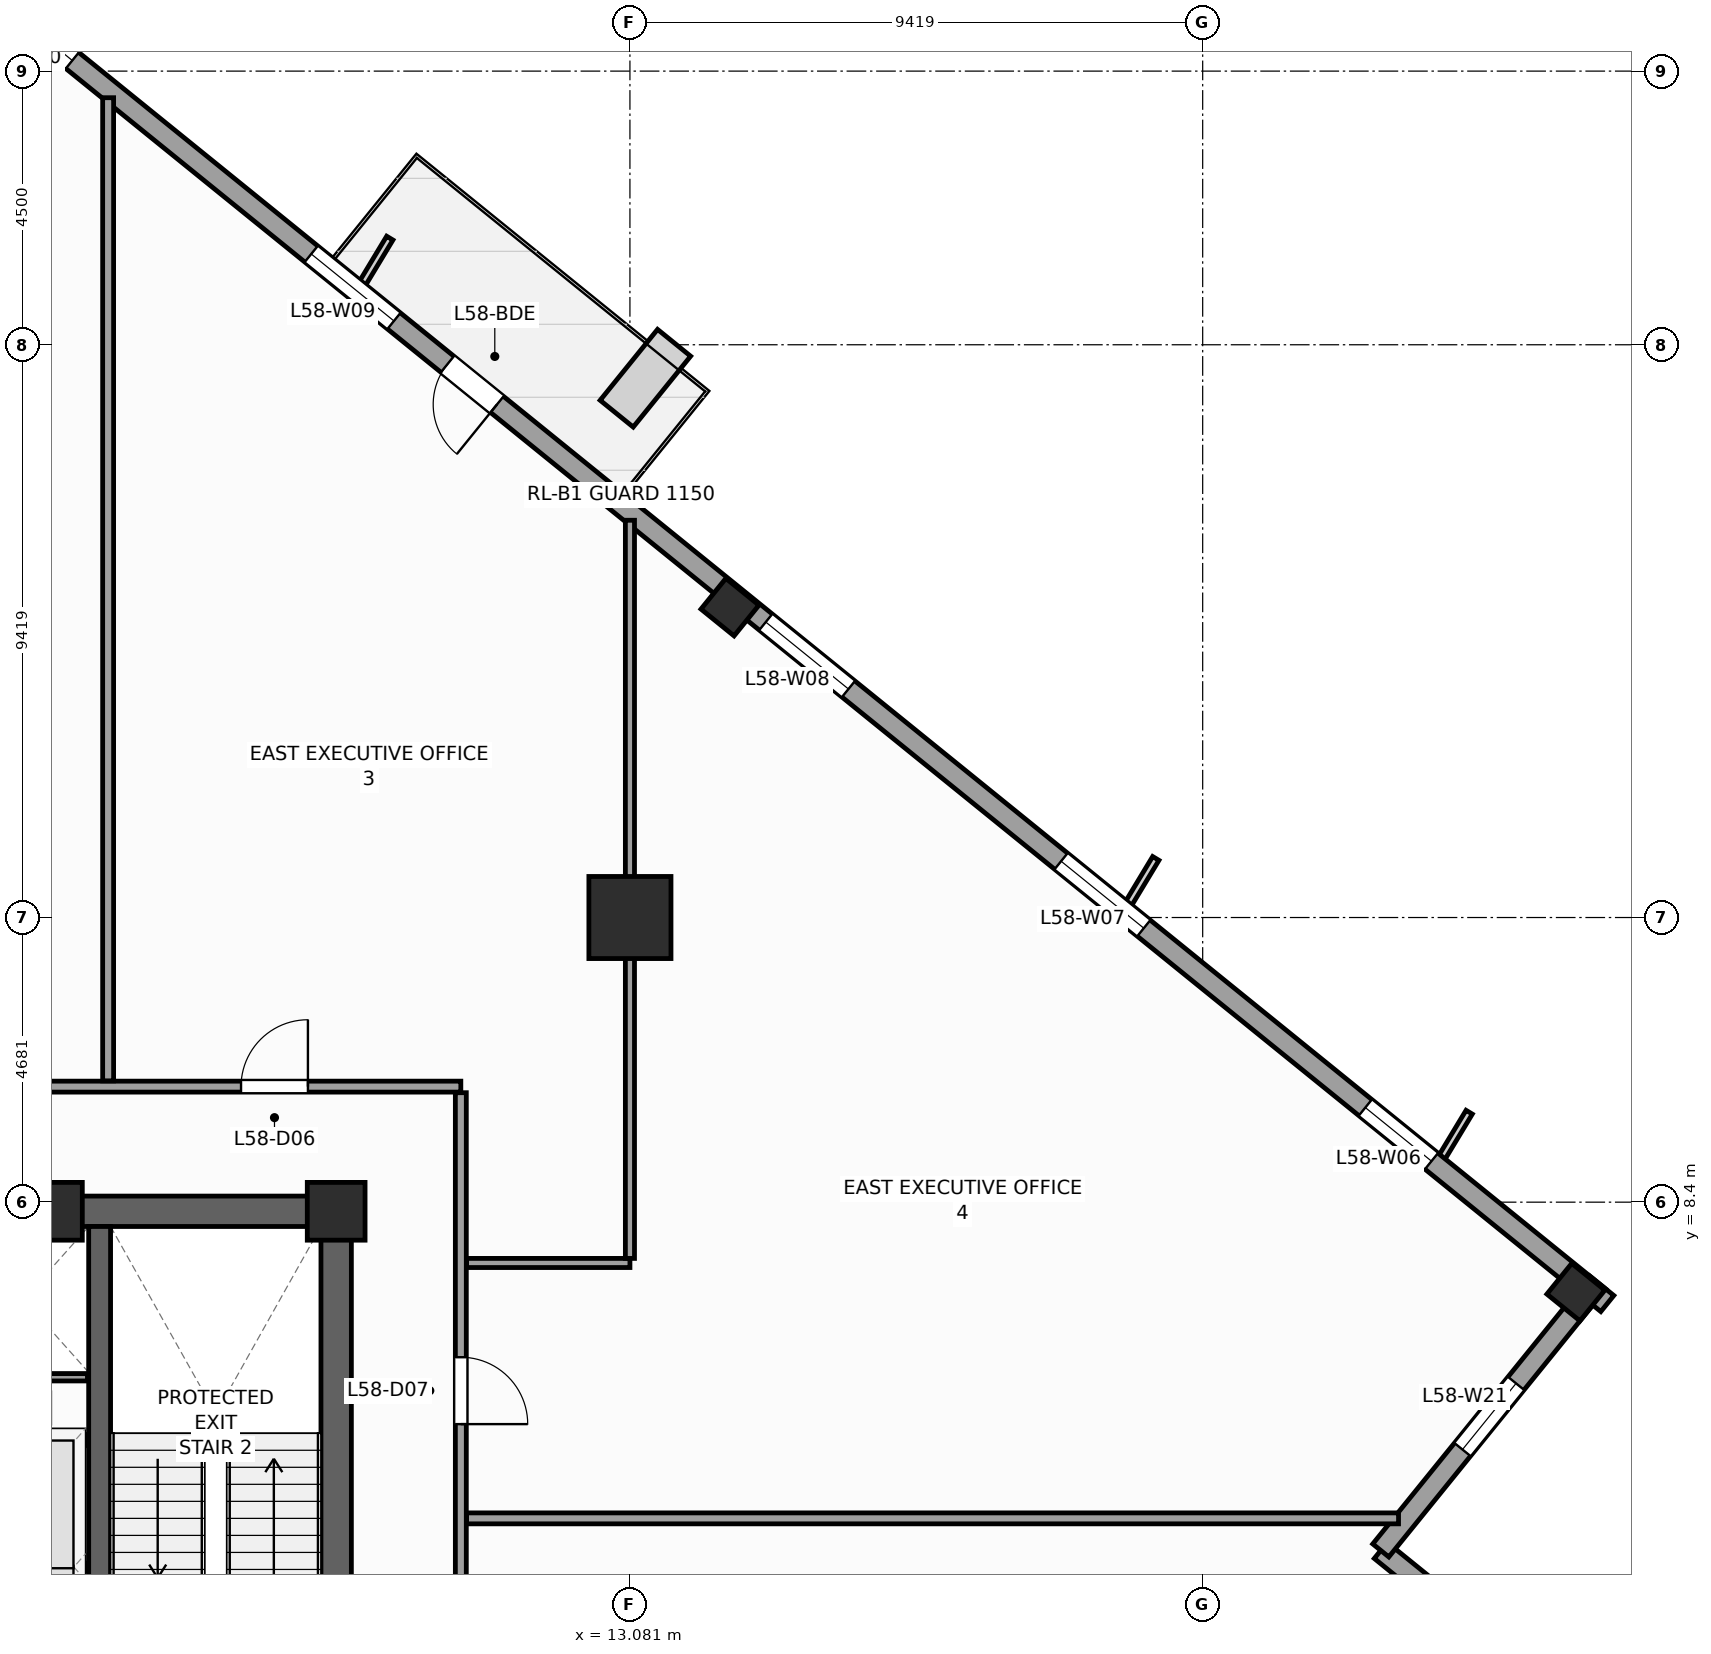
"""IFC4 building model, lengths in metres.
Left out: names, types, materials, properties, quantities, classifications, styles, units other than length and angle.
Written with IfcOpenShell. Run it as: python <this file> out.ifc"""

import sys

from ifc_helpers import new_model, si_unit, direction, frame, frame_2d, origin, origin_2d, place, context, subcontext, project, spatial, rectangle, extrude, source, transform, mapped, element, fill, save


model = new_model("IFC4")
c1 = context("Model", 3, precision=1e-05, world=origin(), true_north=direction((0.0, 1.0)))
c2 = subcontext(c1, "Body", "Model", "MODEL_VIEW")
j1 = project(units=[si_unit("LENGTHUNIT", "METRE"), si_unit("PLANEANGLEUNIT", "RADIAN")], contexts=[c1])
p1 = place(None, origin())
s1 = spatial("IfcSite", under=j1, at=p1, CompositionType="ELEMENT")
p2 = place(p1, origin())
s2 = spatial("IfcBuilding", under=s1, at=p2, CompositionType="ELEMENT")
p3 = place(p2, frame((0.0, 0.0, 240.7)))
s3 = spatial("IfcBuildingStorey", under=s2, at=p3, CompositionType="ELEMENT", Elevation=240.7)
p4 = place(p3, frame((-8.5, 8.25, 0.0), z_axis=(0.0, 0.0, 1.0), x_axis=(1.0, 0.0, 0.0)))
e1 = element("IfcWall", 1, at=p4, inside=s3, PredefinedType="SHEAR", context=c2, shape_type="SweptSolid", body=[
    extrude(rectangle(XDim=17.0, YDim=0.5, at=frame_2d((8.5, 0.0))), origin(), (0.0, 0.0, 1.0), 3.9),
])
p5 = place(p3, frame((8.25, -8.0, 0.0), z_axis=(0.0, 0.0, 1.0), x_axis=(0.0, 1.0, 0.0)))
e2 = element("IfcWall", 2, at=p5, inside=s3, PredefinedType="SHEAR", context=c2, shape_type="SweptSolid", body=[
    extrude(rectangle(XDim=16.0, YDim=0.5, at=frame_2d((8.0, 0.0))), origin(), (0.0, 0.0, 1.0), 3.9),
])
p6 = place(p5, frame((4.69, 0.0, 0.0)))
e3 = element("IfcOpeningElement", 3, at=p6, cuts=e2, PredefinedType="OPENING", context=c2, shape_type="SweptSolid", body=[
    extrude(rectangle(XDim=1.3, YDim=2.2, at=frame_2d((0.65, 1.1))), frame((0.0, 0.26, 0.0), z_axis=(0.0, -1.0, 0.0), x_axis=(1.0, 0.0, 0.0)), (0.0, 0.0, 1.0), 0.52),
])
p7 = place(p3, frame((4.36, -8.0, 0.0), z_axis=(0.0, 0.0, 1.0), x_axis=(0.0, 1.0, 0.0)))
e4 = element("IfcWall", 4, at=p7, inside=s3, PredefinedType="SHEAR", context=c2, shape_type="SweptSolid", body=[
    extrude(rectangle(XDim=16.0, YDim=0.36, at=frame_2d((8.0, 0.0))), origin(), (0.0, 0.0, 1.0), 3.9),
])
m1 = source(origin(), c2, "Body", "SweptSolid", [
    extrude(rectangle(XDim=0.95, YDim=0.95, at=origin_2d()), origin(), (0.0, 0.0, 1.0), 3.9),
])
for number, where, z_axis, x_axis in (
    (5, (8.25, 8.25, 0.0), (0.0, 0.0, 1.0), (1.0, 0.0, 0.0)),
    (6, (3.6, 8.25, 0.0), (0.0, 0.0, 1.0), (1.0, 0.0, 0.0)),
):
    element("IfcColumn", number, at=place(p3, frame(where, z_axis=z_axis, x_axis=x_axis)), inside=s3, PredefinedType="PILASTER", context=c2, shape_type="MappedRepresentation", body=[
        mapped(m1, transform((0.0, 0.0, 0.0), scale=1.0)),
    ])
m2 = source(origin(), c2, "Body", "SweptSolid", [
    extrude(rectangle(XDim=1.35, YDim=1.35, at=origin_2d()), origin(), (0.0, 0.0, 1.0), 3.9),
])
p8 = place(p3, frame((13.081, 13.081, 0.0), z_axis=(0.0, 0.0, 1.0), x_axis=(1.0, 0.0, 0.0)))
e7 = element("IfcColumn", 7, at=p8, inside=s3, PredefinedType="COLUMN", context=c2, shape_type="MappedRepresentation", body=[
    mapped(m2, transform((0.0, 0.0, 0.0), scale=1.0)),
])
m3 = source(origin(), c2, "Body", "SweptSolid", [
    extrude(rectangle(XDim=0.65, YDim=0.7, at=origin_2d()), origin(), (0.0, 0.0, 1.0), 3.9),
])
for number, where, z_axis, x_axis in (
    (8, (28.637, 6.92, 0.0), (0.0, 0.0, 1.0), (0.629, 0.777, 0.0)),
    (9, (14.726, 18.185, 0.0), (0.0, 0.0, 1.0), (0.629, 0.777, 0.0)),
):
    element("IfcColumn", number, at=place(p3, frame(where, z_axis=z_axis, x_axis=x_axis)), inside=s3, PredefinedType="COLUMN", context=c2, shape_type="MappedRepresentation", body=[
        mapped(m3, transform((0.0, 0.0, 0.0), scale=1.0)),
    ])
p9 = place(p3, frame((29.703, -0.789, 0.0), z_axis=(0.0, 0.0, 1.0), x_axis=(-0.77714355312, 0.629323365087, 0.0)))
e10 = element("IfcWall", 10, at=p9, inside=s3, PredefinedType="STANDARD", context=c2, shape_type="SweptSolid", body=[
    extrude(rectangle(XDim=5.5, YDim=0.34, at=frame_2d((2.75, 0.0))), origin(), (0.0, 0.0, 1.0), 3.66),
])
p10 = place(p3, frame((25.429, 2.673, 0.0), z_axis=(0.0, 0.0, 1.0), x_axis=(0.629299794138, 0.777162640055, 0.0)))
e11 = element("IfcWall", 11, at=p10, inside=s3, PredefinedType="STANDARD", context=c2, shape_type="SweptSolid", body=[
    extrude(rectangle(XDim=5.67, YDim=0.34, at=frame_2d((2.835, 0.0))), origin(), (0.0, 0.0, 1.0), 3.66),
])
p11 = place(p10, frame((2.135, 0.0, 0.48)))
e12 = element("IfcOpeningElement", 12, at=p11, cuts=e11, PredefinedType="OPENING", context=c2, shape_type="SweptSolid", body=[
    extrude(rectangle(XDim=1.4, YDim=2.4, at=frame_2d((0.7, 1.2))), frame((0.0, 0.18, 0.0), z_axis=(0.0, -1.0, 0.0), x_axis=(1.0, 0.0, 0.0)), (0.0, 0.0, 1.0), 0.36),
])
p12 = place(p3, frame((29.154, 6.733, 0.0), z_axis=(0.0, 0.0, 1.0), x_axis=(-0.77714192302, 0.629325378072, 0.0)))
e13 = element("IfcWall", 13, at=p12, inside=s3, PredefinedType="STANDARD", context=c2, shape_type="SweptSolid", body=[
    extrude(rectangle(XDim=36.84, YDim=0.34, at=frame_2d((18.42, 0.0))), origin(), (0.0, 0.0, 1.0), 2.96),
])
p13 = place(p12, frame((23.495, 0.0, 0.0)))
e14 = element("IfcOpeningElement", 14, at=p13, cuts=e13, PredefinedType="OPENING", context=c2, shape_type="SweptSolid", body=[
    extrude(rectangle(XDim=1.05, YDim=2.25, at=frame_2d((0.525, 1.125))), frame((0.0, 0.18, 0.0), z_axis=(0.0, -1.0, 0.0), x_axis=(1.0, 0.0, 0.0)), (0.0, 0.0, 1.0), 0.36),
])
p14 = place(p12, frame((3.721, 0.0, 0.48)))
e15 = element("IfcOpeningElement", 15, at=p14, cuts=e13, PredefinedType="OPENING", context=c2, shape_type="SweptSolid", body=[
    extrude(rectangle(XDim=1.4, YDim=2.4, at=frame_2d((0.7, 1.2))), frame((0.0, 0.18, 0.0), z_axis=(0.0, -1.0, 0.0), x_axis=(1.0, 0.0, 0.0)), (0.0, 0.0, 1.0), 0.36),
])
p15 = place(p12, frame((9.809, 0.0, 0.58)))
e16 = element("IfcOpeningElement", 16, at=p15, cuts=e13, PredefinedType="OPENING", context=c2, shape_type="SweptSolid", body=[
    extrude(rectangle(XDim=1.75, YDim=2.3, at=frame_2d((0.875, 1.15))), frame((0.0, 0.18, 0.0), z_axis=(0.0, -1.0, 0.0), x_axis=(1.0, 0.0, 0.0)), (0.0, 0.0, 1.0), 0.36),
])
p16 = place(p12, frame((16.058, 0.0, 0.58)))
e17 = element("IfcOpeningElement", 17, at=p16, cuts=e13, PredefinedType="OPENING", context=c2, shape_type="SweptSolid", body=[
    extrude(rectangle(XDim=1.75, YDim=2.3, at=frame_2d((0.875, 1.15))), frame((0.0, 0.18, 0.0), z_axis=(0.0, -1.0, 0.0), x_axis=(1.0, 0.0, 0.0)), (0.0, 0.0, 1.0), 0.36),
])
p17 = place(p12, frame((25.676, 0.0, 0.58)))
e18 = element("IfcOpeningElement", 18, at=p17, cuts=e13, PredefinedType="OPENING", context=c2, shape_type="SweptSolid", body=[
    extrude(rectangle(XDim=1.75, YDim=2.3, at=frame_2d((0.875, 1.15))), frame((0.0, 0.18, 0.0), z_axis=(0.0, -1.0, 0.0), x_axis=(1.0, 0.0, 0.0)), (0.0, 0.0, 1.0), 0.36),
])
p18 = place(p12, frame((32.482, 0.0, 0.48)))
e19 = element("IfcOpeningElement", 19, at=p18, cuts=e13, PredefinedType="OPENING", context=c2, shape_type="SweptSolid", body=[
    extrude(rectangle(XDim=1.4, YDim=2.4, at=frame_2d((0.7, 1.2))), frame((0.0, 0.18, 0.0), z_axis=(0.0, -1.0, 0.0), x_axis=(1.0, 0.0, 0.0)), (0.0, 0.0, 1.0), 0.36),
])
p19 = place(p3, frame((1.89, 4.49, 0.0), z_axis=(0.0, 0.0, 1.0), x_axis=(1.0, 0.0, 0.0)))
e20 = element("IfcWall", 20, at=p19, inside=s3, PredefinedType="PARTITIONING", context=c2, shape_type="SweptSolid", body=[
    extrude(rectangle(XDim=2.28, YDim=0.18, at=frame_2d((1.14, 0.0))), origin(), (0.0, 0.0, 1.0), 3.66),
])
p20 = place(p3, frame((1.9, 2.4, 0.0), z_axis=(0.0, 0.0, 1.0), x_axis=(1.0, 0.0, 0.0)))
e21 = element("IfcWall", 21, at=p20, inside=s3, PredefinedType="PARTITIONING", context=c2, shape_type="SweptSolid", body=[
    extrude(rectangle(XDim=2.26, YDim=0.12, at=frame_2d((1.13, 0.0))), origin(), (0.0, 0.0, 1.0), 3.66),
])
p21 = place(p3, frame((2.06, 5.52, 0.0), z_axis=(0.0, 0.0, 1.0), x_axis=(1.0, 0.0, 0.0)))
e22 = element("IfcWall", 22, at=p21, inside=s3, PredefinedType="PARTITIONING", context=c2, shape_type="SweptSolid", body=[
    extrude(rectangle(XDim=2.1, YDim=0.12, at=frame_2d((1.05, 0.0))), origin(), (0.0, 0.0, 1.0), 3.66),
])
p22 = place(p3, frame((-11.4, 10.3, 0.0), z_axis=(0.0, 0.0, 1.0), x_axis=(1.0, 0.0, 0.0)))
e23 = element("IfcWall", 23, at=p22, inside=s3, PredefinedType="PARTITIONING", context=c2, shape_type="SweptSolid", body=[
    extrude(rectangle(XDim=21.7, YDim=0.18, at=frame_2d((10.85, 0.0))), origin(), (0.0, 0.0, 1.0), 3.66),
])
p23 = place(p22, frame((10.925, 0.0, 0.0)))
e24 = element("IfcOpeningElement", 24, at=p23, cuts=e23, PredefinedType="OPENING", context=c2, shape_type="SweptSolid", body=[
    extrude(rectangle(XDim=0.95, YDim=2.1, at=frame_2d((0.475, 1.05))), frame((0.0, 0.1, 0.0), z_axis=(0.0, -1.0, 0.0), x_axis=(1.0, 0.0, 0.0)), (0.0, 0.0, 1.0), 0.2),
])
p24 = place(p22, frame((3.724, 0.0, 0.0)))
e25 = element("IfcOpeningElement", 25, at=p24, cuts=e23, PredefinedType="OPENING", context=c2, shape_type="SweptSolid", body=[
    extrude(rectangle(XDim=1.1, YDim=2.2, at=frame_2d((0.55, 1.1))), frame((0.0, 0.1, 0.0), z_axis=(0.0, -1.0, 0.0), x_axis=(1.0, 0.0, 0.0)), (0.0, 0.0, 1.0), 0.2),
])
p25 = place(p22, frame((8.326, 0.0, 0.0)))
e26 = element("IfcOpeningElement", 26, at=p25, cuts=e23, PredefinedType="OPENING", context=c2, shape_type="SweptSolid", body=[
    extrude(rectangle(XDim=1.1, YDim=2.2, at=frame_2d((0.55, 1.1))), frame((0.0, 0.1, 0.0), z_axis=(0.0, -1.0, 0.0), x_axis=(1.0, 0.0, 0.0)), (0.0, 0.0, 1.0), 0.2),
])
p26 = place(p22, frame((18.085, 0.0, 0.0)))
e27 = element("IfcOpeningElement", 27, at=p26, cuts=e23, PredefinedType="OPENING", context=c2, shape_type="SweptSolid", body=[
    extrude(rectangle(XDim=1.1, YDim=2.2, at=frame_2d((0.55, 1.1))), frame((0.0, 0.1, 0.0), z_axis=(0.0, -1.0, 0.0), x_axis=(1.0, 0.0, 0.0)), (0.0, 0.0, 1.0), 0.2),
])
p27 = place(p3, frame((10.3, -10.2, 0.0), z_axis=(0.0, 0.0, 1.0), x_axis=(0.0, 1.0, 0.0)))
e28 = element("IfcWall", 28, at=p27, inside=s3, PredefinedType="PARTITIONING", context=c2, shape_type="SweptSolid", body=[
    extrude(rectangle(XDim=20.4, YDim=0.18, at=frame_2d((10.2, 0.0))), origin(), (0.0, 0.0, 1.0), 3.66),
])
p28 = place(p27, frame((14.95, 0.0, 0.0)))
e29 = element("IfcOpeningElement", 29, at=p28, cuts=e28, PredefinedType="OPENING", context=c2, shape_type="SweptSolid", body=[
    extrude(rectangle(XDim=1.1, YDim=2.2, at=frame_2d((0.55, 1.1))), frame((0.0, 0.1, 0.0), z_axis=(0.0, -1.0, 0.0), x_axis=(1.0, 0.0, 0.0)), (0.0, 0.0, 1.0), 0.2),
])
p29 = place(p27, frame((9.65, 0.0, 0.0)))
e30 = element("IfcOpeningElement", 30, at=p29, cuts=e28, PredefinedType="OPENING", context=c2, shape_type="SweptSolid", body=[
    extrude(rectangle(XDim=1.1, YDim=2.2, at=frame_2d((0.55, 1.1))), frame((0.0, 0.1, 0.0), z_axis=(0.0, -1.0, 0.0), x_axis=(1.0, 0.0, 0.0)), (0.0, 0.0, 1.0), 0.2),
])
p30 = place(p27, frame((4.35, 0.0, 0.0)))
e31 = element("IfcOpeningElement", 31, at=p30, cuts=e28, PredefinedType="OPENING", context=c2, shape_type="SweptSolid", body=[
    extrude(rectangle(XDim=1.1, YDim=2.2, at=frame_2d((0.55, 1.1))), frame((0.0, 0.1, 0.0), z_axis=(0.0, -1.0, 0.0), x_axis=(1.0, 0.0, 0.0)), (0.0, 0.0, 1.0), 0.2),
])
p31 = place(p3, frame((4.5, 10.395, 0.0), z_axis=(0.0, 0.0, 1.0), x_axis=(0.0, 1.0, 0.0)))
e32 = element("IfcWall", 32, at=p31, inside=s3, PredefinedType="PARTITIONING", context=c2, shape_type="SweptSolid", body=[
    extrude(rectangle(XDim=16.168, YDim=0.18, at=frame_2d((8.084, 0.0))), origin(), (0.0, 0.0, 1.0), 3.66),
])
p32 = place(p3, frame((10.395, 3.2, 0.0), z_axis=(0.0, 0.0, 1.0), x_axis=(1.0, 0.0, 0.0)))
e33 = element("IfcWall", 33, at=p32, inside=s3, PredefinedType="PARTITIONING", context=c2, shape_type="SweptSolid", body=[
    extrude(rectangle(XDim=15.326, YDim=0.18, at=frame_2d((7.663, 0.0))), origin(), (0.0, 0.0, 1.0), 3.66),
])
p33 = place(p3, frame((10.395, 7.4, 0.0), z_axis=(0.0, 0.0, 1.0), x_axis=(1.0, 0.0, 0.0)))
e34 = element("IfcWall", 34, at=p33, inside=s3, PredefinedType="PARTITIONING", context=c2, shape_type="SweptSolid", body=[
    extrude(rectangle(XDim=2.686, YDim=0.15, at=frame_2d((1.343, 0.0))), origin(), (0.0, 0.0, 1.0), 3.66),
])
p34 = place(p3, frame((13.081, 7.475, 0.0), z_axis=(0.0, 0.0, 1.0), x_axis=(0.0, 1.0, 0.0)))
e35 = element("IfcWall", 35, at=p34, inside=s3, PredefinedType="PARTITIONING", context=c2, shape_type="SweptSolid", body=[
    extrude(rectangle(XDim=12.139, YDim=0.15, at=frame_2d((6.069, 0.0))), origin(), (0.0, 0.0, 1.0), 2.76),
])
m4 = source(origin(), c2, "Body", "SweptSolid", [
    extrude(rectangle(XDim=1.05, YDim=2.25, at=frame_2d((0.525, 1.125))), frame((0.0, 0.025, 0.0), z_axis=(0.0, -1.0, 0.0), x_axis=(1.0, 0.0, 0.0)), (0.0, 0.0, 1.0), 0.05),
])
p35 = place(p13, origin())
e36 = element("IfcDoor", 36, at=p35, inside=s3, OperationType="SINGLE_SWING_LEFT", PredefinedType="DOOR", context=c2, shape_type="MappedRepresentation", body=[
    mapped(m4, transform((0.0, 0.0, 0.0), scale=1.0)),
])
fill(e14, e36)
m5 = source(origin(), c2, "Body", "SweptSolid", [
    extrude(rectangle(XDim=1.4, YDim=2.4, at=frame_2d((0.7, 1.2))), frame((0.0, 0.03, 0.0), z_axis=(0.0, -1.0, 0.0), x_axis=(1.0, 0.0, 0.0)), (0.0, 0.0, 1.0), 0.06),
])
p36 = place(p14, origin())
e37 = element("IfcWindow", 37, at=p36, inside=s3, PartitioningType="SINGLE_PANEL", PredefinedType="WINDOW", context=c2, shape_type="MappedRepresentation", body=[
    mapped(m5, transform((0.0, 0.0, 0.0), scale=1.0)),
])
fill(e15, e37)
m6 = source(origin(), c2, "Body", "SweptSolid", [
    extrude(rectangle(XDim=1.75, YDim=2.3, at=frame_2d((0.875, 1.15))), frame((0.0, 0.03, 0.0), z_axis=(0.0, -1.0, 0.0), x_axis=(1.0, 0.0, 0.0)), (0.0, 0.0, 1.0), 0.06),
])
p37 = place(p15, origin())
e38 = element("IfcWindow", 38, at=p37, inside=s3, PartitioningType="SINGLE_PANEL", PredefinedType="WINDOW", context=c2, shape_type="MappedRepresentation", body=[
    mapped(m6, transform((0.0, 0.0, 0.0), scale=1.0)),
])
fill(e16, e38)
p38 = place(p16, origin())
e39 = element("IfcWindow", 39, at=p38, inside=s3, PartitioningType="SINGLE_PANEL", PredefinedType="WINDOW", context=c2, shape_type="MappedRepresentation", body=[
    mapped(m6, transform((0.0, 0.0, 0.0), scale=1.0)),
])
fill(e17, e39)
p39 = place(p17, origin())
e40 = element("IfcWindow", 40, at=p39, inside=s3, PartitioningType="SINGLE_PANEL", PredefinedType="WINDOW", context=c2, shape_type="MappedRepresentation", body=[
    mapped(m6, transform((0.0, 0.0, 0.0), scale=1.0)),
])
fill(e18, e40)
p40 = place(p18, origin())
e41 = element("IfcWindow", 41, at=p40, inside=s3, PartitioningType="SINGLE_PANEL", PredefinedType="WINDOW", context=c2, shape_type="MappedRepresentation", body=[
    mapped(m5, transform((0.0, 0.0, 0.0), scale=1.0)),
])
fill(e19, e41)
p41 = place(p11, origin())
e42 = element("IfcWindow", 42, at=p41, inside=s3, PartitioningType="SINGLE_PANEL", PredefinedType="WINDOW", context=c2, shape_type="MappedRepresentation", body=[
    mapped(m5, transform((0.0, 0.0, 0.0), scale=1.0)),
])
fill(e12, e42)
m7 = source(origin(), c2, "Body", "SweptSolid", [
    extrude(rectangle(XDim=1.1, YDim=2.2, at=frame_2d((0.55, 1.1))), frame((0.0, 0.025, 0.0), z_axis=(0.0, -1.0, 0.0), x_axis=(1.0, 0.0, 0.0)), (0.0, 0.0, 1.0), 0.05),
])
p42 = place(p26, origin())
e43 = element("IfcDoor", 43, at=p42, inside=s3, OperationType="SINGLE_SWING_RIGHT", PredefinedType="DOOR", context=c2, shape_type="MappedRepresentation", body=[
    mapped(m7, transform((0.0, 0.0, 0.0), scale=1.0)),
])
fill(e27, e43)
p43 = place(p28, frame((1.1, 0.0, 0.0), z_axis=(0.0, 0.0, 1.0), x_axis=(-1.0, 0.0, 0.0)))
e44 = element("IfcDoor", 44, at=p43, inside=s3, OperationType="SINGLE_SWING_LEFT", PredefinedType="DOOR", context=c2, shape_type="MappedRepresentation", body=[
    mapped(m7, transform((0.0, 0.0, 0.0), scale=1.0)),
])
fill(e29, e44)
save(model, sys.argv[1])
